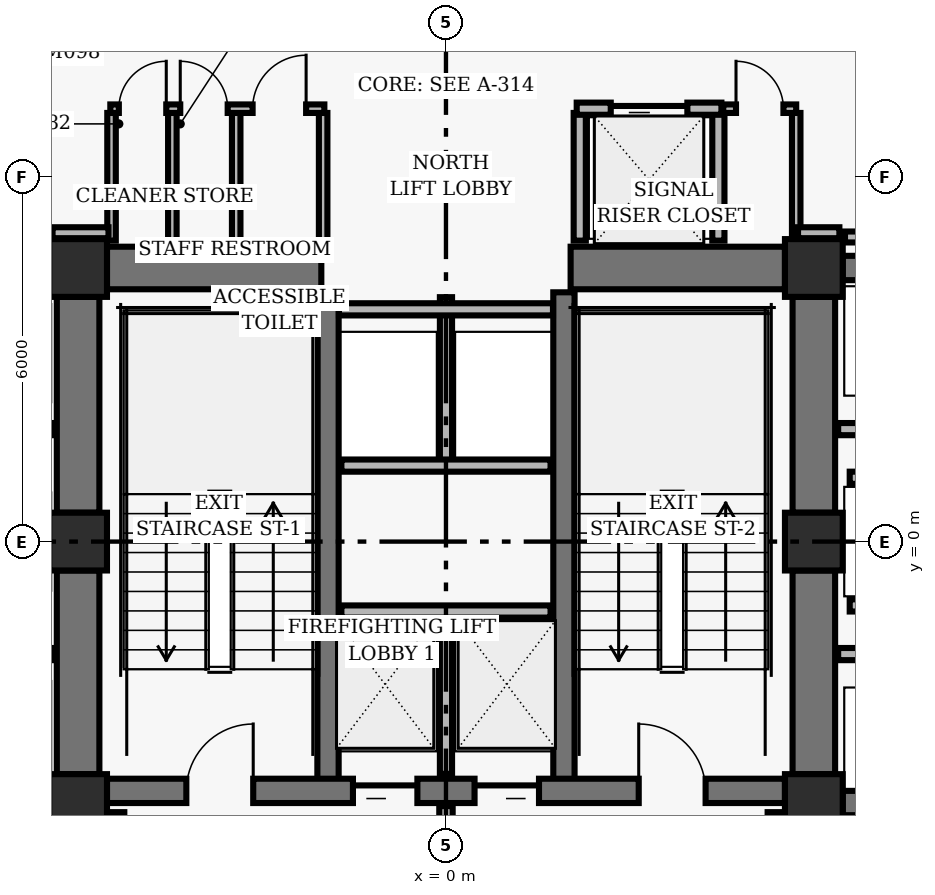
"""IFC4 building model, lengths in metres.
Left out: names, types, materials, properties, quantities, classifications, styles, units other than length and angle.
Written with IfcOpenShell. Run it as: python <this file> out.ifc"""

import sys

from ifc_helpers import new_model, si_unit, direction, frame, frame_2d, origin, origin_2d, place, context, subcontext, project, spatial, rectangle, hollow_rectangle, extrude, element, fill, save


model = new_model("IFC4")
c1 = context("Model", 3, precision=1e-05, world=origin(), true_north=direction((0.0, 1.0)))
c2 = subcontext(c1, "Body", "Model", "MODEL_VIEW")
j1 = project(units=[si_unit("LENGTHUNIT", "METRE"), si_unit("PLANEANGLEUNIT", "RADIAN")], contexts=[c1])
p1 = place(None, origin())
s1 = spatial("IfcSite", under=j1, at=p1, CompositionType="ELEMENT")
p2 = place(p1, origin())
s2 = spatial("IfcBuilding", under=s1, at=p2, CompositionType="ELEMENT")
p3 = place(p2, frame((0.0, 0.0, 32.32)))
s3 = spatial("IfcBuildingStorey", under=s2, at=p3, CompositionType="ELEMENT", Elevation=32.32)
for number, where, z_axis, x_axis in (
    (1, (-6.05, 4.5, 0.0), (0.0, 0.0, 1.0), (1.0, 0.0, 0.0)),
    (2, (6.05, 4.5, 0.0), (0.0, 0.0, 1.0), (1.0, 0.0, 0.0)),
    (3, (-6.05, 0.0, 0.0), (0.0, 0.0, 1.0), (1.0, 0.0, 0.0)),
    (4, (6.05, 0.0, 0.0), (0.0, 0.0, 1.0), (1.0, 0.0, 0.0)),
    (5, (-6.05, -4.3, 0.0), (0.0, 0.0, 1.0), (1.0, 0.0, 0.0)),
    (6, (6.05, -4.3, 0.0), (0.0, 0.0, 1.0), (1.0, 0.0, 0.0)),
):
    element("IfcColumn", number, at=place(p3, frame(where, z_axis=z_axis, x_axis=x_axis)), inside=s3, PredefinedType="COLUMN", context=c2, shape_type="SweptSolid", body=[
        extrude(hollow_rectangle(XDim=0.95, YDim=0.95, WallThickness=0.06, InnerFilletRadius=0.02, OuterFilletRadius=0.04, at=origin_2d()), origin(), (0.0, 0.0, 1.0), 3.36),
    ])
p4 = place(p3, frame((-6.05, 0.475, 0.0), z_axis=(0.0, 0.0, 1.0), x_axis=(0.0, 1.0, 0.0)))
e7 = element("IfcWall", 7, at=p4, inside=s3, PredefinedType="SHEAR", context=c2, shape_type="SweptSolid", body=[
    extrude(rectangle(XDim=3.55, YDim=0.7, at=frame_2d((1.775, 0.0))), origin(), (0.0, 0.0, 1.0), 3.098),
])
p5 = place(p3, frame((-6.05, -3.825, 0.0), z_axis=(0.0, 0.0, 1.0), x_axis=(0.0, 1.0, 0.0)))
e8 = element("IfcWall", 8, at=p5, inside=s3, PredefinedType="SHEAR", context=c2, shape_type="SweptSolid", body=[
    extrude(rectangle(XDim=3.35, YDim=0.7, at=frame_2d((1.675, 0.0))), origin(), (0.0, 0.0, 1.0), 3.098),
])
p6 = place(p3, frame((6.05, 0.475, 0.0), z_axis=(0.0, 0.0, 1.0), x_axis=(0.0, 1.0, 0.0)))
e9 = element("IfcWall", 9, at=p6, inside=s3, PredefinedType="SHEAR", context=c2, shape_type="SweptSolid", body=[
    extrude(rectangle(XDim=3.55, YDim=0.7, at=frame_2d((1.775, 0.0))), origin(), (0.0, 0.0, 1.0), 3.098),
])
p7 = place(p3, frame((6.05, -3.825, 0.0), z_axis=(0.0, 0.0, 1.0), x_axis=(0.0, 1.0, 0.0)))
e10 = element("IfcWall", 10, at=p7, inside=s3, PredefinedType="SHEAR", context=c2, shape_type="SweptSolid", body=[
    extrude(rectangle(XDim=3.35, YDim=0.7, at=frame_2d((1.675, 0.0))), origin(), (0.0, 0.0, 1.0), 3.098),
])
for number, where, z_axis, x_axis in (
    (11, (-1.94, -4.1, 0.0), (0.0, 0.0, 1.0), (0.0, 1.0, 0.0)),
    (12, (1.94, -4.1, 0.0), (0.0, 0.0, 1.0), (0.0, 1.0, 0.0)),
):
    element("IfcWall", number, at=place(p3, frame(where, z_axis=z_axis, x_axis=x_axis)), inside=s3, PredefinedType="SHEAR", context=c2, shape_type="SweptSolid", body=[
        extrude(rectangle(XDim=8.2, YDim=0.35, at=frame_2d((4.1, 0.0))), origin(), (0.0, 0.0, 1.0), 3.098),
    ])
p8 = place(p3, frame((-5.575, -4.1, 0.0), z_axis=(0.0, 0.0, 1.0), x_axis=(1.0, 0.0, 0.0)))
e13 = element("IfcWall", 13, at=p8, inside=s3, PredefinedType="SHEAR", context=c2, shape_type="SweptSolid", body=[
    extrude(rectangle(XDim=11.15, YDim=0.4, at=frame_2d((5.575, 0.0))), origin(), (0.0, 0.0, 1.0), 3.098),
])
p9 = place(p8, frame((1.305, 0.0, 0.0)))
e14 = element("IfcOpeningElement", 14, at=p9, cuts=e13, PredefinedType="OPENING", context=c2, shape_type="SweptSolid", body=[
    extrude(rectangle(XDim=1.1, YDim=2.04, at=frame_2d((0.55, 1.02))), frame((0.0, 0.21, 0.0), z_axis=(0.0, -1.0, 0.0), x_axis=(1.0, 0.0, 0.0)), (0.0, 0.0, 1.0), 0.42),
])
p10 = place(p8, frame((8.745, 0.0, 0.0)))
e15 = element("IfcOpeningElement", 15, at=p10, cuts=e13, PredefinedType="OPENING", context=c2, shape_type="SweptSolid", body=[
    extrude(rectangle(XDim=1.1, YDim=2.04, at=frame_2d((0.55, 1.02))), frame((0.0, 0.21, 0.0), z_axis=(0.0, -1.0, 0.0), x_axis=(1.0, 0.0, 0.0)), (0.0, 0.0, 1.0), 0.42),
])
p11 = place(p8, frame((4.045, 0.0, 0.0)))
e16 = element("IfcOpeningElement", 16, at=p11, cuts=e13, PredefinedType="OPENING", context=c2, shape_type="SweptSolid", body=[
    extrude(rectangle(XDim=1.06, YDim=2.04, at=frame_2d((0.53, 1.02))), frame((0.0, 0.21, 0.0), z_axis=(0.0, -1.0, 0.0), x_axis=(1.0, 0.0, 0.0)), (0.0, 0.0, 1.0), 0.42),
])
p12 = place(p8, frame((6.045, 0.0, 0.0)))
e17 = element("IfcOpeningElement", 17, at=p12, cuts=e13, PredefinedType="OPENING", context=c2, shape_type="SweptSolid", body=[
    extrude(rectangle(XDim=1.06, YDim=2.04, at=frame_2d((0.53, 1.02))), frame((0.0, 0.21, 0.0), z_axis=(0.0, -1.0, 0.0), x_axis=(1.0, 0.0, 0.0)), (0.0, 0.0, 1.0), 0.42),
])
for number, where, z_axis, x_axis in (
    (18, (-5.575, 4.5, 0.0), (0.0, 0.0, 1.0), (1.0, 0.0, 0.0)),
    (19, (2.05, 4.5, 0.0), (0.0, 0.0, 1.0), (1.0, 0.0, 0.0)),
):
    element("IfcWall", number, at=place(p3, frame(where, z_axis=z_axis, x_axis=x_axis)), inside=s3, PredefinedType="SHEAR", context=c2, shape_type="SweptSolid", body=[
        extrude(rectangle(XDim=3.525, YDim=0.7, at=frame_2d((1.762, 0.0))), origin(), (0.0, 0.0, 1.0), 3.098),
    ])
for number, where, z_axis, x_axis in (
    (20, (6.525, 4.5, 0.0), (0.0, 0.0, 1.0), (1.0, 0.0, 0.0)),
    (21, (6.525, -4.3, 0.0), (0.0, 0.0, 1.0), (1.0, 0.0, 0.0)),
):
    element("IfcWall", number, at=place(p3, frame(where, z_axis=z_axis, x_axis=x_axis)), inside=s3, PredefinedType="SHEAR", context=c2, shape_type="SweptSolid", body=[
        extrude(rectangle(XDim=1.95, YDim=0.4, at=frame_2d((0.975, 0.0))), origin(), (0.0, 0.0, 1.0), 3.098),
    ])
p13 = place(p3, frame((0.0, -3.82, 0.0), z_axis=(0.0, 0.0, 1.0), x_axis=(0.0, 1.0, 0.0)))
e22 = element("IfcWall", 22, at=p13, inside=s3, PredefinedType="PARTITIONING", context=c2, shape_type="SweptSolid", body=[
    extrude(rectangle(XDim=2.67, YDim=0.2, at=frame_2d((1.335, 0.0))), origin(), (0.0, 0.0, 1.0), 3.073),
])
p14 = place(p3, frame((-1.72, -1.15, 0.0), z_axis=(0.0, 0.0, 1.0), x_axis=(1.0, 0.0, 0.0)))
e23 = element("IfcWall", 23, at=p14, inside=s3, PredefinedType="PARTITIONING", context=c2, shape_type="SweptSolid", body=[
    extrude(rectangle(XDim=3.44, YDim=0.2, at=frame_2d((1.72, 0.0))), origin(), (0.0, 0.0, 1.0), 3.073),
])
for number, where, z_axis, x_axis in (
    (24, (-5.4, -7.16, 0.0), (0.0, 0.0, 1.0), (0.0, 1.0, 0.0)),
    (25, (5.4, -7.16, 0.0), (0.0, 0.0, 1.0), (0.0, 1.0, 0.0)),
):
    element("IfcWall", number, at=place(p3, frame(where, z_axis=z_axis, x_axis=x_axis)), inside=s3, PredefinedType="PARTITIONING", context=c2, shape_type="SweptSolid", body=[
        extrude(rectangle(XDim=2.71, YDim=0.22, at=frame_2d((1.355, 0.0))), origin(), (0.0, 0.0, 1.0), 3.073),
    ])
p15 = place(p3, frame((0.0, -7.16, 0.0), z_axis=(0.0, 0.0, 1.0), x_axis=(0.0, 1.0, 0.0)))
e26 = element("IfcWall", 26, at=p15, inside=s3, PredefinedType="PARTITIONING", context=c2, shape_type="SweptSolid", body=[
    extrude(rectangle(XDim=2.81, YDim=0.22, at=frame_2d((1.405, 0.0))), origin(), (0.0, 0.0, 1.0), 3.073),
])
p16 = place(p3, frame((0.0, 1.25, 0.0), z_axis=(0.0, 0.0, 1.0), x_axis=(0.0, 1.0, 0.0)))
e27 = element("IfcWall", 27, at=p16, inside=s3, PredefinedType="PARTITIONING", context=c2, shape_type="SweptSolid", body=[
    extrude(rectangle(XDim=2.77, YDim=0.2, at=frame_2d((1.385, 0.0))), origin(), (0.0, 0.0, 1.0), 3.073),
])
p17 = place(p3, frame((-1.72, 1.25, 0.0), z_axis=(0.0, 0.0, 1.0), x_axis=(1.0, 0.0, 0.0)))
e28 = element("IfcWall", 28, at=p17, inside=s3, PredefinedType="PARTITIONING", context=c2, shape_type="SweptSolid", body=[
    extrude(rectangle(XDim=3.44, YDim=0.2, at=frame_2d((1.72, 0.0))), origin(), (0.0, 0.0, 1.0), 3.073),
])
p18 = place(p3, frame((-1.76, 3.82, 0.0), z_axis=(0.0, 0.0, 1.0), x_axis=(1.0, 0.0, 0.0)))
e29 = element("IfcWall", 29, at=p18, inside=s3, PredefinedType="PARTITIONING", context=c2, shape_type="SweptSolid", body=[
    extrude(rectangle(XDim=3.52, YDim=0.2, at=frame_2d((1.76, 0.0))), origin(), (0.0, 0.0, 1.0), 3.073),
])
for number, where, z_axis, x_axis in (
    (30, (2.2, 4.95, 0.0), (0.0, 0.0, 1.0), (0.0, 1.0, 0.0)),
    (31, (4.48, 4.95, 0.0), (0.0, 0.0, 1.0), (0.0, 1.0, 0.0)),
):
    element("IfcWall", number, at=place(p3, frame(where, z_axis=z_axis, x_axis=x_axis)), inside=s3, PredefinedType="PARTITIONING", context=c2, shape_type="SweptSolid", body=[
        extrude(rectangle(XDim=2.1, YDim=0.2, at=frame_2d((1.05, 0.0))), origin(), (0.0, 0.0, 1.0), 3.073),
    ])
p19 = place(p3, frame((2.15, 7.12, 0.0), z_axis=(0.0, 0.0, 1.0), x_axis=(1.0, 0.0, 0.0)))
e32 = element("IfcWall", 32, at=p19, inside=s3, PredefinedType="PARTITIONING", context=c2, shape_type="SweptSolid", body=[
    extrude(rectangle(XDim=2.38, YDim=0.2, at=frame_2d((1.19, 0.0))), origin(), (0.0, 0.0, 1.0), 3.073),
])
p20 = place(p19, frame((0.56, 0.0, 0.0)))
e33 = element("IfcOpeningElement", 33, at=p20, cuts=e32, PredefinedType="OPENING", context=c2, shape_type="SweptSolid", body=[
    extrude(rectangle(XDim=1.26, YDim=2.06, at=frame_2d((0.63, 1.03))), frame((0.0, 0.11, 0.0), z_axis=(0.0, -1.0, 0.0), x_axis=(1.0, 0.0, 0.0)), (0.0, 0.0, 1.0), 0.22),
])
for number, where, z_axis, x_axis in (
    (34, (-5.5, 4.95, 0.0), (0.0, 0.0, 1.0), (0.0, 1.0, 0.0)),
    (35, (-4.5, 4.95, 0.0), (0.0, 0.0, 1.0), (0.0, 1.0, 0.0)),
    (36, (-3.45, 4.95, 0.0), (0.0, 0.0, 1.0), (0.0, 1.0, 0.0)),
    (37, (-2.02, 4.95, 0.0), (0.0, 0.0, 1.0), (0.0, 1.0, 0.0)),
):
    element("IfcWall", number, at=place(p3, frame(where, z_axis=z_axis, x_axis=x_axis)), inside=s3, PredefinedType="PARTITIONING", context=c2, shape_type="SweptSolid", body=[
        extrude(rectangle(XDim=2.1, YDim=0.14, at=frame_2d((1.05, 0.0))), origin(), (0.0, 0.0, 1.0), 3.073),
    ])
p21 = place(p3, frame((-5.52, 7.12, 0.0), z_axis=(0.0, 0.0, 1.0), x_axis=(1.0, 0.0, 0.0)))
e38 = element("IfcWall", 38, at=p21, inside=s3, PredefinedType="PARTITIONING", context=c2, shape_type="SweptSolid", body=[
    extrude(rectangle(XDim=3.52, YDim=0.14, at=frame_2d((1.76, 0.0))), origin(), (0.0, 0.0, 1.0), 3.073),
])
p22 = place(p21, frame((0.14, 0.0, 0.0)))
e39 = element("IfcOpeningElement", 39, at=p22, cuts=e38, PredefinedType="OPENING", context=c2, shape_type="SweptSolid", body=[
    extrude(rectangle(XDim=0.78, YDim=2.01, at=frame_2d((0.39, 1.005))), frame((0.0, 0.08, 0.0), z_axis=(0.0, -1.0, 0.0), x_axis=(1.0, 0.0, 0.0)), (0.0, 0.0, 1.0), 0.16),
])
p23 = place(p21, frame((1.15, 0.0, 0.0)))
e40 = element("IfcOpeningElement", 40, at=p23, cuts=e38, PredefinedType="OPENING", context=c2, shape_type="SweptSolid", body=[
    extrude(rectangle(XDim=0.78, YDim=2.01, at=frame_2d((0.39, 1.005))), frame((0.0, 0.08, 0.0), z_axis=(0.0, -1.0, 0.0), x_axis=(1.0, 0.0, 0.0)), (0.0, 0.0, 1.0), 0.16),
])
p24 = place(p21, frame((2.34, 0.0, 0.0)))
e41 = element("IfcOpeningElement", 41, at=p24, cuts=e38, PredefinedType="OPENING", context=c2, shape_type="SweptSolid", body=[
    extrude(rectangle(XDim=0.88, YDim=2.02, at=frame_2d((0.44, 1.01))), frame((0.0, 0.08, 0.0), z_axis=(0.0, -1.0, 0.0), x_axis=(1.0, 0.0, 0.0)), (0.0, 0.0, 1.0), 0.16),
])
p25 = place(p3, frame((5.76, 4.95, 0.0), z_axis=(0.0, 0.0, 1.0), x_axis=(0.0, 1.0, 0.0)))
e42 = element("IfcWall", 42, at=p25, inside=s3, PredefinedType="PARTITIONING", context=c2, shape_type="SweptSolid", body=[
    extrude(rectangle(XDim=2.1, YDim=0.14, at=frame_2d((1.05, 0.0))), origin(), (0.0, 0.0, 1.0), 3.073),
])
p26 = place(p3, frame((4.56, 7.12, 0.0), z_axis=(0.0, 0.0, 1.0), x_axis=(1.0, 0.0, 0.0)))
e43 = element("IfcWall", 43, at=p26, inside=s3, PredefinedType="PARTITIONING", context=c2, shape_type="SweptSolid", body=[
    extrude(rectangle(XDim=1.2, YDim=0.14, at=frame_2d((0.6, 0.0))), origin(), (0.0, 0.0, 1.0), 3.073),
])
p27 = place(p26, frame((0.21, 0.0, 0.0)))
e44 = element("IfcOpeningElement", 44, at=p27, cuts=e43, PredefinedType="OPENING", context=c2, shape_type="SweptSolid", body=[
    extrude(rectangle(XDim=0.78, YDim=2.01, at=frame_2d((0.39, 1.005))), frame((0.0, 0.08, 0.0), z_axis=(0.0, -1.0, 0.0), x_axis=(1.0, 0.0, 0.0)), (0.0, 0.0, 1.0), 0.16),
])
for number, where, z_axis, x_axis in (
    (45, (-8.55, -1.85, 0.0), (0.0, 0.0, 1.0), (1.0, 0.0, 0.0)),
    (46, (-8.55, 1.85, 0.0), (0.0, 0.0, 1.0), (1.0, 0.0, 0.0)),
    (47, (6.45, -1.85, 0.0), (0.0, 0.0, 1.0), (1.0, 0.0, 0.0)),
    (48, (6.45, 1.85, 0.0), (0.0, 0.0, 1.0), (1.0, 0.0, 0.0)),
):
    element("IfcWall", number, at=place(p3, frame(where, z_axis=z_axis, x_axis=x_axis)), inside=s3, PredefinedType="PARTITIONING", context=c2, shape_type="SweptSolid", body=[
        extrude(rectangle(XDim=2.1, YDim=0.2, at=frame_2d((1.05, 0.0))), origin(), (0.0, 0.0, 1.0), 3.073),
    ])
for number, where, z_axis, x_axis in (
    (49, (6.64, -1.05, 0.0), (0.0, 0.0, 1.0), (1.0, 0.0, 0.0)),
    (50, (6.64, 1.05, 0.0), (0.0, 0.0, 1.0), (1.0, 0.0, 0.0)),
):
    element("IfcWall", number, at=place(p3, frame(where, z_axis=z_axis, x_axis=x_axis)), inside=s3, PredefinedType="PARTITIONING", context=c2, shape_type="SweptSolid", body=[
        extrude(rectangle(XDim=1.91, YDim=0.2, at=frame_2d((0.955, 0.0))), origin(), (0.0, 0.0, 1.0), 3.073),
    ])
p28 = place(p3, frame((9.37, 5.01, 0.0), z_axis=(0.0, 0.0, 1.0), x_axis=(-1.0, 0.0, 0.0)))
e51 = element("IfcWall", 51, at=p28, inside=s3, PredefinedType="PARTITIONING", context=c2, shape_type="SweptSolid", body=[
    extrude(rectangle(XDim=2.808, YDim=0.18, at=frame_2d((1.404, 0.0))), origin(), (0.0, 0.0, 1.0), 3.073),
])
p29 = place(p3, frame((6.47, 5.08, 0.0), z_axis=(0.0, 0.0, 1.0), x_axis=(-1.0, 0.0, 0.0)))
e52 = element("IfcWall", 52, at=p29, inside=s3, PredefinedType="PARTITIONING", context=c2, shape_type="SweptSolid", body=[
    extrude(rectangle(XDim=0.68, YDim=0.18, at=frame_2d((0.34, 0.0))), origin(), (0.0, 0.0, 1.0), 3.073),
])
p30 = place(p3, frame((-5.55, 5.08, 0.0), z_axis=(0.0, 0.0, 1.0), x_axis=(-1.0, 0.0, 0.0)))
e53 = element("IfcWall", 53, at=p30, inside=s3, PredefinedType="PARTITIONING", context=c2, shape_type="SweptSolid", body=[
    extrude(rectangle(XDim=0.92, YDim=0.18, at=frame_2d((0.46, 0.0))), origin(), (0.0, 0.0, 1.0), 3.073),
])
p31 = place(p9, origin())
e54 = element("IfcDoor", 54, at=p31, inside=s3, OperationType="SINGLE_SWING_RIGHT", PredefinedType="DOOR", context=c2, shape_type="SweptSolid", body=[
    extrude(rectangle(XDim=1.1, YDim=2.04, at=frame_2d((0.55, 1.02))), frame((0.0, 0.025, 0.0), z_axis=(0.0, -1.0, 0.0), x_axis=(1.0, 0.0, 0.0)), (0.0, 0.0, 1.0), 0.05),
])
fill(e14, e54)
p32 = place(p10, origin())
e55 = element("IfcDoor", 55, at=p32, inside=s3, OperationType="SINGLE_SWING_LEFT", PredefinedType="DOOR", context=c2, shape_type="SweptSolid", body=[
    extrude(rectangle(XDim=1.1, YDim=2.04, at=frame_2d((0.55, 1.02))), frame((0.0, 0.025, 0.0), z_axis=(0.0, -1.0, 0.0), x_axis=(1.0, 0.0, 0.0)), (0.0, 0.0, 1.0), 0.05),
])
fill(e15, e55)
p33 = place(p11, origin())
e56 = element("IfcDoor", 56, at=p33, inside=s3, OperationType="SLIDING_TO_LEFT", PredefinedType="DOOR", context=c2, shape_type="SweptSolid", body=[
    extrude(rectangle(XDim=1.06, YDim=2.04, at=frame_2d((0.53, 1.02))), frame((0.0, 0.025, 0.0), z_axis=(0.0, -1.0, 0.0), x_axis=(1.0, 0.0, 0.0)), (0.0, 0.0, 1.0), 0.05),
])
fill(e16, e56)
p34 = place(p12, origin())
e57 = element("IfcDoor", 57, at=p34, inside=s3, OperationType="SLIDING_TO_RIGHT", PredefinedType="DOOR", context=c2, shape_type="SweptSolid", body=[
    extrude(rectangle(XDim=1.06, YDim=2.04, at=frame_2d((0.53, 1.02))), frame((0.0, 0.025, 0.0), z_axis=(0.0, -1.0, 0.0), x_axis=(1.0, 0.0, 0.0)), (0.0, 0.0, 1.0), 0.05),
])
fill(e17, e57)
p35 = place(p20, origin())
e58 = element("IfcDoor", 58, at=p35, inside=s3, OperationType="SLIDING_TO_LEFT", PredefinedType="DOOR", context=c2, shape_type="SweptSolid", body=[
    extrude(rectangle(XDim=1.26, YDim=2.06, at=frame_2d((0.63, 1.03))), frame((0.0, 0.025, 0.0), z_axis=(0.0, -1.0, 0.0), x_axis=(1.0, 0.0, 0.0)), (0.0, 0.0, 1.0), 0.05),
])
fill(e33, e58)
p36 = place(p22, origin())
e59 = element("IfcDoor", 59, at=p36, inside=s3, OperationType="SINGLE_SWING_RIGHT", PredefinedType="DOOR", context=c2, shape_type="SweptSolid", body=[
    extrude(rectangle(XDim=0.78, YDim=2.01, at=frame_2d((0.39, 1.005))), frame((0.0, 0.025, 0.0), z_axis=(0.0, -1.0, 0.0), x_axis=(1.0, 0.0, 0.0)), (0.0, 0.0, 1.0), 0.05),
])
fill(e39, e59)
p37 = place(p23, origin())
e60 = element("IfcDoor", 60, at=p37, inside=s3, OperationType="SINGLE_SWING_LEFT", PredefinedType="DOOR", context=c2, shape_type="SweptSolid", body=[
    extrude(rectangle(XDim=0.78, YDim=2.01, at=frame_2d((0.39, 1.005))), frame((0.0, 0.025, 0.0), z_axis=(0.0, -1.0, 0.0), x_axis=(1.0, 0.0, 0.0)), (0.0, 0.0, 1.0), 0.05),
])
fill(e40, e60)
p38 = place(p24, origin())
e61 = element("IfcDoor", 61, at=p38, inside=s3, OperationType="SINGLE_SWING_RIGHT", PredefinedType="DOOR", context=c2, shape_type="SweptSolid", body=[
    extrude(rectangle(XDim=0.88, YDim=2.02, at=frame_2d((0.44, 1.01))), frame((0.0, 0.025, 0.0), z_axis=(0.0, -1.0, 0.0), x_axis=(1.0, 0.0, 0.0)), (0.0, 0.0, 1.0), 0.05),
])
fill(e41, e61)
p39 = place(p27, origin())
e62 = element("IfcDoor", 62, at=p39, inside=s3, OperationType="SINGLE_SWING_LEFT", PredefinedType="DOOR", context=c2, shape_type="SweptSolid", body=[
    extrude(rectangle(XDim=0.78, YDim=2.01, at=frame_2d((0.39, 1.005))), frame((0.0, 0.025, 0.0), z_axis=(0.0, -1.0, 0.0), x_axis=(1.0, 0.0, 0.0)), (0.0, 0.0, 1.0), 0.05),
])
fill(e44, e62)
save(model, sys.argv[1])
